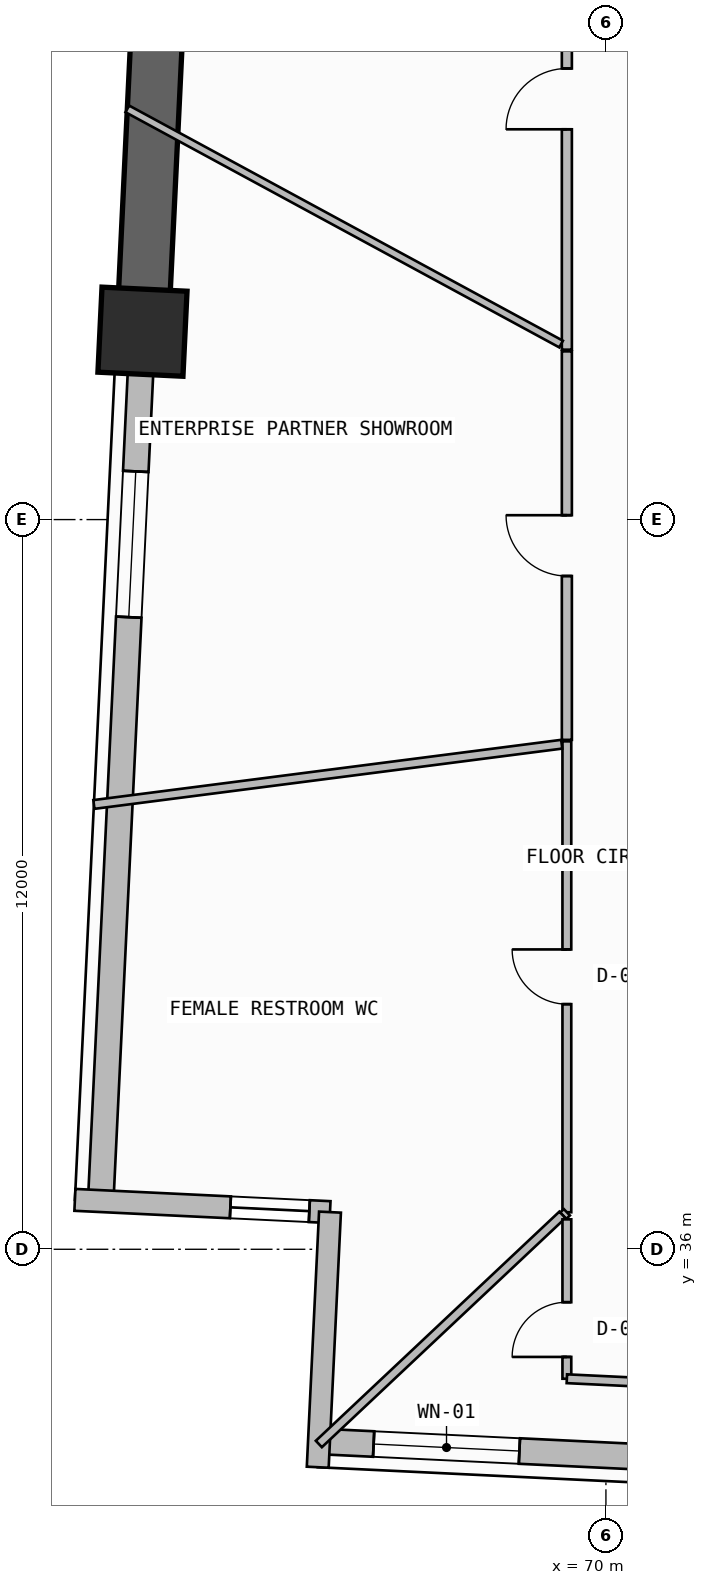
"""IFC4 building model, lengths in metres.
Left out: names, types, materials, properties, quantities, classifications, styles, units other than length and angle.
Written with IfcOpenShell. Run it as: python <this file> out.ifc"""

import sys

from ifc_helpers import new_model, si_unit, direction, frame, frame_2d, origin, origin_2d, place, context, subcontext, project, spatial, rectangle, extrude, element, fill, save


model = new_model("IFC4")
c1 = context("Model", 3, precision=1e-05, world=origin(), true_north=direction((0.0, 1.0)))
c2 = subcontext(c1, "Body", "Model", "MODEL_VIEW")
j1 = project(units=[si_unit("LENGTHUNIT", "METRE"), si_unit("PLANEANGLEUNIT", "RADIAN")], contexts=[c1])
p1 = place(None, origin())
s1 = spatial("IfcSite", under=j1, at=p1, CompositionType="ELEMENT")
p2 = place(p1, origin())
s2 = spatial("IfcBuilding", under=s1, at=p2, CompositionType="ELEMENT")
p3 = place(p2, frame((0.0, 0.0, 33.9)))
s3 = spatial("IfcBuildingStorey", under=s2, at=p3, CompositionType="ELEMENT", Elevation=33.9)
p4 = place(p3, frame((62.378, 51.09, 0.0), z_axis=(0.0, 0.0, 1.0), x_axis=(0.047978128521, 0.998848386485, 0.0)))
e1 = element("IfcColumn", 1, at=p4, inside=s3, PredefinedType="COLUMN", context=c2, shape_type="SweptSolid", body=[
    extrude(rectangle(XDim=1.4, YDim=1.4, at=origin_2d()), origin(), (0.0, 0.0, 1.0), 3.6),
])
p5 = place(p3, frame((65.281, 32.841, 0.0), z_axis=(0.0, 0.0, 1.0), x_axis=(0.998848298084, -0.047979968897, 0.0)))
e2 = element("IfcWall", 2, at=p5, inside=s3, PredefinedType="SOLIDWALL", context=c2, shape_type="SweptSolid", body=[
    extrude(rectangle(XDim=17.952, YDim=0.42, at=frame_2d((8.976, 0.0))), origin(), (0.0, 0.0, 1.0), 2.325),
])
p6 = place(p5, frame((0.9, 0.0, 1.2)))
e3 = element("IfcOpeningElement", 3, at=p6, cuts=e2, PredefinedType="OPENING", context=c2, shape_type="SweptSolid", body=[
    extrude(rectangle(XDim=2.4, YDim=0.9, at=frame_2d((1.2, 0.45))), frame((0.0, 0.22, 0.0), z_axis=(0.0, -1.0, 0.0), x_axis=(1.0, 0.0, 0.0)), (0.0, 0.0, 1.0), 0.44),
])
p7 = place(p3, frame((63.428, 72.957, -0.2), z_axis=(0.0, 0.0, 1.0), x_axis=(-0.047976309476, -0.998848473858, 0.0)))
e4 = element("IfcWall", 4, at=p7, inside=s3, PredefinedType="SHEAR", context=c2, shape_type="SweptSolid", body=[
    extrude(rectangle(XDim=21.892, YDim=0.85, at=frame_2d((10.946, 0.0))), origin(), (0.0, 0.0, 1.0), 3.54),
])
p8 = place(p3, frame((62.378, 51.09, 0.0), z_axis=(0.0, 0.0, 1.0), x_axis=(-0.047978424452, -0.99884837227, 0.0)))
e5 = element("IfcWall", 5, at=p8, inside=s3, PredefinedType="SOLIDWALL", context=c2, shape_type="SweptSolid", body=[
    extrude(rectangle(XDim=14.314, YDim=0.42, at=frame_2d((7.157, 0.0))), origin(), (0.0, 0.0, 1.0), 2.325),
])
p9 = place(p8, frame((2.3, 0.0, 1.2)))
e6 = element("IfcOpeningElement", 6, at=p9, cuts=e5, PredefinedType="OPENING", context=c2, shape_type="SweptSolid", body=[
    extrude(rectangle(XDim=2.4, YDim=0.9, at=frame_2d((1.2, 0.45))), frame((0.0, 0.22, 0.0), z_axis=(0.0, -1.0, 0.0), x_axis=(1.0, 0.0, 0.0)), (0.0, 0.0, 1.0), 0.44),
])
p10 = place(p3, frame((61.267, 36.812, 0.0), z_axis=(0.0, 0.0, 1.0), x_axis=(0.998849519138, -0.047954542207, 0.0)))
e7 = element("IfcWall", 7, at=p10, inside=s3, PredefinedType="SOLIDWALL", context=c2, shape_type="SweptSolid", body=[
    extrude(rectangle(XDim=4.2, YDim=0.36, at=frame_2d((2.1, 0.0))), origin(), (0.0, 0.0, 1.0), 3.34),
])
p11 = place(p10, frame((2.56, 0.0, 0.45)))
e8 = element("IfcOpeningElement", 8, at=p11, cuts=e7, PredefinedType="OPENING", context=c2, shape_type="SweptSolid", body=[
    extrude(rectangle(XDim=1.3, YDim=2.4, at=frame_2d((0.65, 1.2))), frame((0.0, 0.19, 0.0), z_axis=(0.0, -1.0, 0.0), x_axis=(1.0, 0.0, 0.0)), (0.0, 0.0, 1.0), 0.38),
])
p12 = place(p3, frame((65.462, 36.611, 0.0), z_axis=(0.0, 0.0, 1.0), x_axis=(-0.048015322758, -0.998846599224, 0.0)))
e9 = element("IfcWall", 9, at=p12, inside=s3, PredefinedType="SOLIDWALL", context=c2, shape_type="SweptSolid", body=[
    extrude(rectangle(XDim=4.2, YDim=0.36, at=frame_2d((2.1, 0.0))), origin(), (0.0, 0.0, 1.0), 3.34),
])
p13 = place(p3, frame((69.357, 44.353, 0.0), z_axis=(0.0, 0.0, 1.0), x_axis=(0.0, -1.0, 0.0)))
e10 = element("IfcWall", 10, at=p13, inside=s3, PredefinedType="PARTITIONING", context=c2, shape_type="SweptSolid", body=[
    extrude(rectangle(XDim=7.744, YDim=0.145, at=frame_2d((3.872, 0.0))), origin(), (0.0, 0.0, 1.0), 3.34),
])
p14 = place(p13, frame((3.422, 0.0, 0.0)))
e11 = element("IfcOpeningElement", 11, at=p14, cuts=e10, PredefinedType="OPENING", context=c2, shape_type="SweptSolid", body=[
    extrude(rectangle(XDim=0.9, YDim=2.1, at=frame_2d((0.45, 1.05))), frame((0.0, 0.083, 0.0), z_axis=(0.0, -1.0, 0.0), x_axis=(1.0, 0.0, 0.0)), (0.0, 0.0, 1.0), 0.165),
])
p15 = place(p3, frame((69.357, 36.609, 0.0), z_axis=(0.0, 0.0, 1.0), x_axis=(-0.723154482123, -0.690686321701, 0.0)))
e12 = element("IfcWall", 12, at=p15, inside=s3, PredefinedType="PARTITIONING", context=c2, shape_type="SweptSolid", body=[
    extrude(rectangle(XDim=0.083, YDim=0.145, at=frame_2d((0.042, 0.0))), origin(), (0.0, 0.0, 1.0), 3.34),
])
p16 = place(p3, frame((69.284, 36.566, 0.0), z_axis=(0.0, 0.0, 1.0), x_axis=(-0.728310768674, -0.685246980463, 0.0)))
e13 = element("IfcWall", 13, at=p16, inside=s3, PredefinedType="PARTITIONING", context=c2, shape_type="SweptSolid", body=[
    extrude(rectangle(XDim=5.499, YDim=0.145, at=frame_2d((2.75, 0.0))), origin(), (0.0, 0.0, 1.0), 3.34),
])
p17 = place(p3, frame((61.579, 43.315, 0.0), z_axis=(0.0, 0.0, 1.0), x_axis=(0.991807089994, 0.127744652481, 0.0)))
e14 = element("IfcWall", 14, at=p17, inside=s3, PredefinedType="PARTITIONING", context=c2, shape_type="SweptSolid", body=[
    extrude(rectangle(XDim=7.757, YDim=0.145, at=frame_2d((3.879, 0.0))), origin(), (0.0, 0.0, 1.0), 3.34),
])
p18 = place(p3, frame((69.357, 36.492, 0.0), z_axis=(0.0, 0.0, 1.0), x_axis=(0.0, -1.0, 0.0)))
e15 = element("IfcWall", 15, at=p18, inside=s3, PredefinedType="PARTITIONING", context=c2, shape_type="SweptSolid", body=[
    extrude(rectangle(XDim=2.621, YDim=0.145, at=frame_2d((1.311, 0.0))), origin(), (0.0, 0.0, 1.0), 3.34),
])
p19 = place(p18, frame((1.363, 0.0, 0.0)))
e16 = element("IfcOpeningElement", 16, at=p19, cuts=e15, PredefinedType="OPENING", context=c2, shape_type="SweptSolid", body=[
    extrude(rectangle(XDim=0.9, YDim=2.1, at=frame_2d((0.45, 1.05))), frame((0.0, 0.083, 0.0), z_axis=(0.0, -1.0, 0.0), x_axis=(1.0, 0.0, 0.0)), (0.0, 0.0, 1.0), 0.165),
])
p20 = place(p3, frame((69.357, 33.871, 0.0), z_axis=(0.0, 0.0, 1.0), x_axis=(0.998850579145, -0.047932458132, 0.0)))
e17 = element("IfcWall", 17, at=p20, inside=s3, PredefinedType="PARTITIONING", context=c2, shape_type="SweptSolid", body=[
    extrude(rectangle(XDim=1.895, YDim=0.145, at=frame_2d((0.947, 0.0))), origin(), (0.0, 0.0, 1.0), 3.34),
])
p21 = place(p3, frame((69.357, 59.042, 0.0), z_axis=(0.0, 0.0, 1.0), x_axis=(0.0, -1.0, 0.0)))
e18 = element("IfcWall", 18, at=p21, inside=s3, PredefinedType="PARTITIONING", context=c2, shape_type="SweptSolid", body=[
    extrude(rectangle(XDim=8.249, YDim=0.165, at=frame_2d((4.124, 0.0))), origin(), (0.0, 0.0, 1.0), 2.725),
])
p22 = place(p21, frame((3.624, 0.0, 0.0)))
e19 = element("IfcOpeningElement", 19, at=p22, cuts=e18, PredefinedType="OPENING", context=c2, shape_type="SweptSolid", body=[
    extrude(rectangle(XDim=1.0, YDim=2.2, at=frame_2d((0.5, 1.1))), frame((0.0, 0.093, 0.0), z_axis=(0.0, -1.0, 0.0), x_axis=(1.0, 0.0, 0.0)), (0.0, 0.0, 1.0), 0.185),
])
p23 = place(p3, frame((69.263, 50.886, 0.0), z_axis=(0.0, 0.0, 1.0), x_axis=(-0.879129707002, 0.47658258284, 0.0)))
e20 = element("IfcWall", 20, at=p23, inside=s3, PredefinedType="PARTITIONING", context=c2, shape_type="SweptSolid", body=[
    extrude(rectangle(XDim=8.115, YDim=0.125, at=frame_2d((4.058, 0.0))), origin(), (0.0, 0.0, 1.0), 2.325),
])
p24 = place(p3, frame((69.357, 50.767, 0.0), z_axis=(0.0, 0.0, 1.0), x_axis=(0.0, -1.0, 0.0)))
e21 = element("IfcWall", 21, at=p24, inside=s3, PredefinedType="PARTITIONING", context=c2, shape_type="SweptSolid", body=[
    extrude(rectangle(XDim=6.389, YDim=0.165, at=frame_2d((3.195, 0.0))), origin(), (0.0, 0.0, 1.0), 3.34),
])
p25 = place(p24, frame((2.695, 0.0, 0.0)))
e22 = element("IfcOpeningElement", 22, at=p25, cuts=e21, PredefinedType="OPENING", context=c2, shape_type="SweptSolid", body=[
    extrude(rectangle(XDim=1.0, YDim=2.2, at=frame_2d((0.5, 1.1))), frame((0.0, 0.093, 0.0), z_axis=(0.0, -1.0, 0.0), x_axis=(1.0, 0.0, 0.0)), (0.0, 0.0, 1.0), 0.185),
])
p26 = place(p6, origin())
e23 = element("IfcWindow", 23, at=p26, inside=s3, PartitioningType="SINGLE_PANEL", PredefinedType="WINDOW", context=c2, shape_type="SweptSolid", body=[
    extrude(rectangle(XDim=2.4, YDim=0.9, at=frame_2d((1.2, 0.45))), frame((0.0, 0.03, 0.0), z_axis=(0.0, -1.0, 0.0), x_axis=(1.0, 0.0, 0.0)), (0.0, 0.0, 1.0), 0.06),
])
fill(e3, e23)
p27 = place(p9, origin())
e24 = element("IfcWindow", 24, at=p27, inside=s3, PartitioningType="SINGLE_PANEL", PredefinedType="WINDOW", context=c2, shape_type="SweptSolid", body=[
    extrude(rectangle(XDim=2.4, YDim=0.9, at=frame_2d((1.2, 0.45))), frame((0.0, 0.03, 0.0), z_axis=(0.0, -1.0, 0.0), x_axis=(1.0, 0.0, 0.0)), (0.0, 0.0, 1.0), 0.06),
])
fill(e6, e24)
p28 = place(p11, origin())
e25 = element("IfcWindow", 25, at=p28, inside=s3, PartitioningType="SINGLE_PANEL", PredefinedType="WINDOW", context=c2, shape_type="SweptSolid", body=[
    extrude(rectangle(XDim=1.3, YDim=2.4, at=frame_2d((0.65, 1.2))), frame((0.0, 0.03, 0.0), z_axis=(0.0, -1.0, 0.0), x_axis=(1.0, 0.0, 0.0)), (0.0, 0.0, 1.0), 0.06),
])
fill(e8, e25)
p29 = place(p14, frame((0.9, 0.0, 0.0), z_axis=(0.0, 0.0, 1.0), x_axis=(-1.0, 0.0, 0.0)))
e26 = element("IfcDoor", 26, at=p29, inside=s3, OperationType="SINGLE_SWING_RIGHT", PredefinedType="DOOR", context=c2, shape_type="SweptSolid", body=[
    extrude(rectangle(XDim=0.9, YDim=2.1, at=frame_2d((0.45, 1.05))), frame((0.0, 0.025, 0.0), z_axis=(0.0, -1.0, 0.0), x_axis=(1.0, 0.0, 0.0)), (0.0, 0.0, 1.0), 0.05),
])
fill(e11, e26)
p30 = place(p19, frame((0.9, 0.0, 0.0), z_axis=(0.0, 0.0, 1.0), x_axis=(-1.0, 0.0, 0.0)))
e27 = element("IfcDoor", 27, at=p30, inside=s3, OperationType="SINGLE_SWING_LEFT", PredefinedType="DOOR", context=c2, shape_type="SweptSolid", body=[
    extrude(rectangle(XDim=0.9, YDim=2.1, at=frame_2d((0.45, 1.05))), frame((0.0, 0.025, 0.0), z_axis=(0.0, -1.0, 0.0), x_axis=(1.0, 0.0, 0.0)), (0.0, 0.0, 1.0), 0.05),
])
fill(e16, e27)
p31 = place(p22, frame((1.0, 0.0, 0.0), z_axis=(0.0, 0.0, 1.0), x_axis=(-1.0, 0.0, 0.0)))
e28 = element("IfcDoor", 28, at=p31, inside=s3, OperationType="SINGLE_SWING_LEFT", PredefinedType="DOOR", context=c2, shape_type="SweptSolid", body=[
    extrude(rectangle(XDim=1.0, YDim=2.2, at=frame_2d((0.5, 1.1))), frame((0.0, 0.025, 0.0), z_axis=(0.0, -1.0, 0.0), x_axis=(1.0, 0.0, 0.0)), (0.0, 0.0, 1.0), 0.05),
])
fill(e19, e28)
p32 = place(p25, frame((1.0, 0.0, 0.0), z_axis=(0.0, 0.0, 1.0), x_axis=(-1.0, 0.0, 0.0)))
e29 = element("IfcDoor", 29, at=p32, inside=s3, OperationType="SINGLE_SWING_RIGHT", PredefinedType="DOOR", context=c2, shape_type="SweptSolid", body=[
    extrude(rectangle(XDim=1.0, YDim=2.2, at=frame_2d((0.5, 1.1))), frame((0.0, 0.025, 0.0), z_axis=(0.0, -1.0, 0.0), x_axis=(1.0, 0.0, 0.0)), (0.0, 0.0, 1.0), 0.05),
])
fill(e22, e29)
save(model, sys.argv[1])
